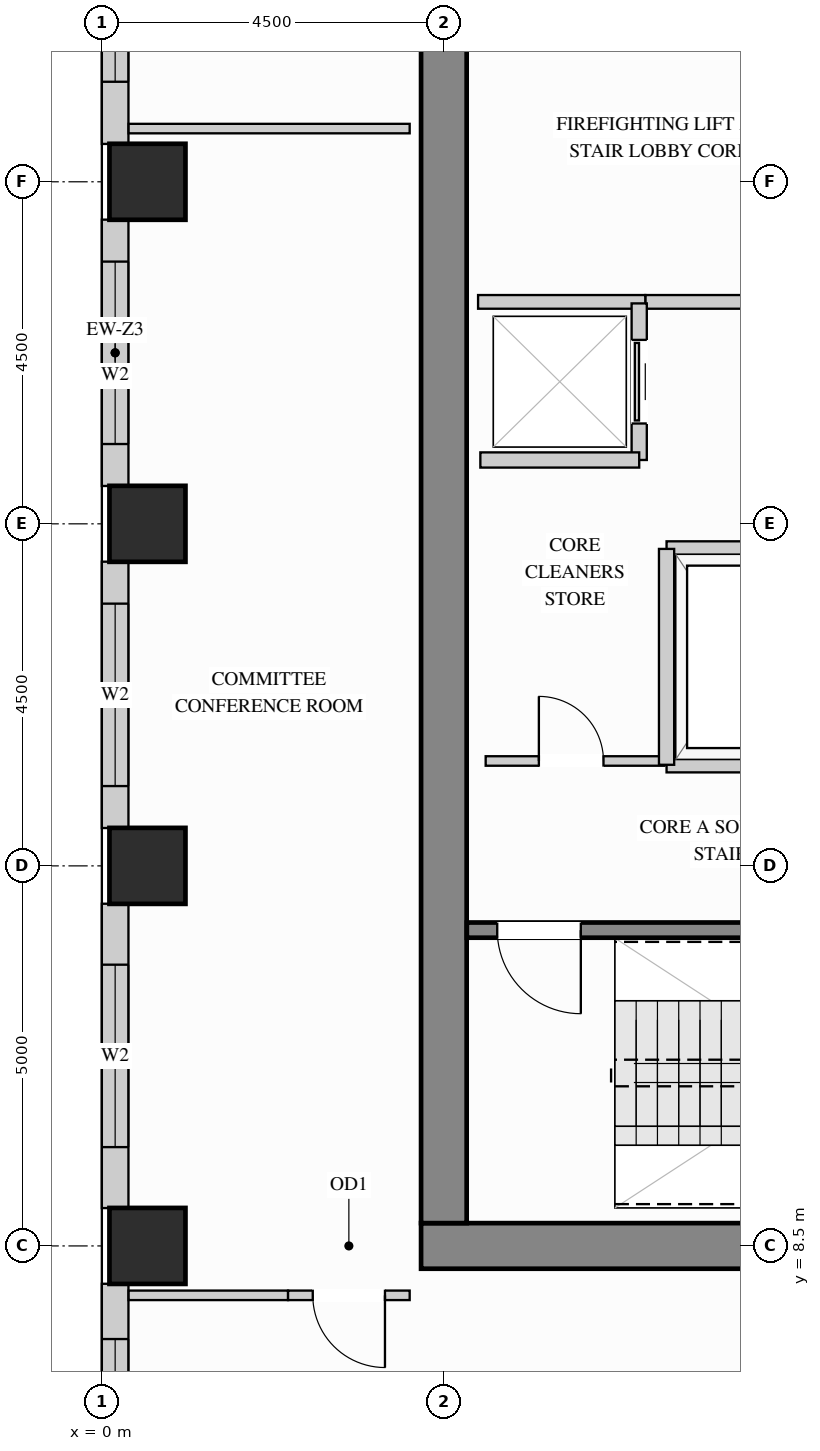
"""IFC4 building model, lengths in metres.
Left out: names, types, materials, properties, quantities, classifications, styles, units other than length and angle.
Written with IfcOpenShell. Run it as: python <this file> out.ifc"""

import sys

from ifc_helpers import new_model, si_unit, direction, frame, frame_2d, origin, origin_2d, place, context, subcontext, project, spatial, rectangle, extrude, source, transform, mapped, element, fill, save


model = new_model("IFC4")
c1 = context("Model", 3, precision=1e-05, world=origin(), true_north=direction((0.0, 1.0)))
c2 = subcontext(c1, "Body", "Model", "MODEL_VIEW")
j1 = project(units=[si_unit("LENGTHUNIT", "METRE"), si_unit("PLANEANGLEUNIT", "RADIAN")], contexts=[c1])
p1 = place(None, origin())
s1 = spatial("IfcSite", under=j1, at=p1, CompositionType="ELEMENT")
p2 = place(p1, origin())
s2 = spatial("IfcBuilding", under=s1, at=p2, CompositionType="ELEMENT")
p3 = place(p2, frame((0.0, 0.0, 179.1)))
s3 = spatial("IfcBuildingStorey", under=s2, at=p3, CompositionType="ELEMENT", Elevation=179.1)
m1 = source(origin(), c2, "Body", "SweptSolid", [
    extrude(rectangle(XDim=1.0, YDim=1.0, at=origin_2d()), origin(), (0.0, 0.0, 1.0), 3.4),
])
for number, where, z_axis, x_axis in (
    (1, (0.6, 13.5, 0.0), (0.0, 0.0, 1.0), (1.0, 0.0, 0.0)),
    (2, (0.6, 18.0, 0.0), (0.0, 0.0, 1.0), (1.0, 0.0, 0.0)),
    (3, (0.6, 22.5, 0.0), (0.0, 0.0, 1.0), (1.0, 0.0, 0.0)),
    (4, (0.6, 8.5, 0.0), (0.0, 0.0, 1.0), (1.0, 0.0, 0.0)),
):
    element("IfcColumn", number, at=place(p3, frame(where, z_axis=z_axis, x_axis=x_axis)), inside=s3, PredefinedType="COLUMN", context=c2, shape_type="MappedRepresentation", body=[
        mapped(m1, transform((0.0, 0.0, 0.0), x_axis=(1.0, 0.0, 0.0), y_axis=(0.0, 1.0, 0.0), z_axis=(0.0, 0.0, 1.0))),
    ])
m2 = source(origin(), c2, "Body", "SweptSolid", [
    extrude(rectangle(XDim=10.6, YDim=0.6, at=frame_2d((5.3, 0.0))), origin(), (0.0, 0.0, 1.0), 3.4),
])
p4 = place(p3, frame((4.2, 8.5, 0.0), z_axis=(0.0, 0.0, 1.0), x_axis=(1.0, 0.0, 0.0)))
e5 = element("IfcWall", 5, at=p4, inside=s3, PredefinedType="SHEAR", context=c2, shape_type="MappedRepresentation", body=[
    mapped(m2, transform((0.0, 0.0, 0.0), x_axis=(1.0, 0.0, 0.0), y_axis=(0.0, 1.0, 0.0), z_axis=(0.0, 0.0, 1.0))),
])
m3 = source(origin(), c2, "Body", "SweptSolid", [
    extrude(rectangle(XDim=20.4, YDim=0.6, at=frame_2d((10.2, 0.0))), origin(), (0.0, 0.0, 1.0), 3.4),
])
p5 = place(p3, frame((4.5, 8.8, 0.0), z_axis=(0.0, 0.0, 1.0), x_axis=(0.0, 1.0, 0.0)))
e6 = element("IfcWall", 6, at=p5, inside=s3, PredefinedType="SHEAR", context=c2, shape_type="MappedRepresentation", body=[
    mapped(m3, transform((0.0, 0.0, 0.0), x_axis=(1.0, 0.0, 0.0), y_axis=(0.0, 1.0, 0.0), z_axis=(0.0, 0.0, 1.0))),
])
p6 = place(p3, frame((0.175, 26.302, 0.0), z_axis=(0.0, 0.0, 1.0), x_axis=(0.0, -1.0, 0.0)))
e7 = element("IfcWall", 7, at=p6, inside=s3, PredefinedType="SOLIDWALL", context=c2, shape_type="SweptSolid", body=[
    extrude(rectangle(XDim=3.304, YDim=0.35, at=frame_2d((1.652, 0.0))), origin(), (0.0, 0.0, 1.0), 2.612),
])
p7 = place(p6, frame((0.686, 0.0, 0.78)))
e8 = element("IfcOpeningElement", 8, at=p7, cuts=e7, PredefinedType="OPENING", context=c2, shape_type="SweptSolid", body=[
    extrude(rectangle(XDim=1.8, YDim=1.652, at=frame_2d((0.9, 0.826))), frame((0.0, 0.185, 0.0), z_axis=(0.0, -1.0, 0.0), x_axis=(1.0, 0.0, 0.0)), (0.0, 0.0, 1.0), 0.37),
])
p8 = place(p3, frame((0.175, 22.002, 0.0), z_axis=(0.0, 0.0, 1.0), x_axis=(0.0, -1.0, 0.0)))
e9 = element("IfcWall", 9, at=p8, inside=s3, PredefinedType="SOLIDWALL", context=c2, shape_type="SweptSolid", body=[
    extrude(rectangle(XDim=3.504, YDim=0.35, at=frame_2d((1.752, 0.0))), origin(), (0.0, 0.0, 1.0), 2.612),
])
p9 = place(p8, frame((0.552, 0.0, 0.78)))
e10 = element("IfcOpeningElement", 10, at=p9, cuts=e9, PredefinedType="OPENING", context=c2, shape_type="SweptSolid", body=[
    extrude(rectangle(XDim=2.4, YDim=1.652, at=frame_2d((1.2, 0.826))), frame((0.0, 0.185, 0.0), z_axis=(0.0, -1.0, 0.0), x_axis=(1.0, 0.0, 0.0)), (0.0, 0.0, 1.0), 0.37),
])
p10 = place(p3, frame((0.175, 17.502, 0.0), z_axis=(0.0, 0.0, 1.0), x_axis=(0.0, -1.0, 0.0)))
e11 = element("IfcWall", 11, at=p10, inside=s3, PredefinedType="SOLIDWALL", context=c2, shape_type="SweptSolid", body=[
    extrude(rectangle(XDim=3.504, YDim=0.35, at=frame_2d((1.752, 0.0))), origin(), (0.0, 0.0, 1.0), 2.612),
])
p11 = place(p10, frame((0.552, 0.0, 0.78)))
e12 = element("IfcOpeningElement", 12, at=p11, cuts=e11, PredefinedType="OPENING", context=c2, shape_type="SweptSolid", body=[
    extrude(rectangle(XDim=2.4, YDim=1.652, at=frame_2d((1.2, 0.826))), frame((0.0, 0.185, 0.0), z_axis=(0.0, -1.0, 0.0), x_axis=(1.0, 0.0, 0.0)), (0.0, 0.0, 1.0), 0.37),
])
p12 = place(p3, frame((0.175, 13.002, 0.0), z_axis=(0.0, 0.0, 1.0), x_axis=(0.0, -1.0, 0.0)))
e13 = element("IfcWall", 13, at=p12, inside=s3, PredefinedType="SOLIDWALL", context=c2, shape_type="SweptSolid", body=[
    extrude(rectangle(XDim=4.004, YDim=0.35, at=frame_2d((2.002, 0.0))), origin(), (0.0, 0.0, 1.0), 2.612),
])
p13 = place(p12, frame((0.802, 0.0, 0.78)))
e14 = element("IfcOpeningElement", 14, at=p13, cuts=e13, PredefinedType="OPENING", context=c2, shape_type="SweptSolid", body=[
    extrude(rectangle(XDim=2.4, YDim=1.652, at=frame_2d((1.2, 0.826))), frame((0.0, 0.185, 0.0), z_axis=(0.0, -1.0, 0.0), x_axis=(1.0, 0.0, 0.0)), (0.0, 0.0, 1.0), 0.37),
])
p14 = place(p3, frame((0.175, 8.002, 0.0), z_axis=(0.0, 0.0, 1.0), x_axis=(0.0, -1.0, 0.0)))
e15 = element("IfcWall", 15, at=p14, inside=s3, PredefinedType="SOLIDWALL", context=c2, shape_type="SweptSolid", body=[
    extrude(rectangle(XDim=4.004, YDim=0.35, at=frame_2d((2.002, 0.0))), origin(), (0.0, 0.0, 1.0), 2.612),
])
p15 = place(p14, frame((0.727, 0.0, 0.78)))
e16 = element("IfcOpeningElement", 16, at=p15, cuts=e15, PredefinedType="OPENING", context=c2, shape_type="SweptSolid", body=[
    extrude(rectangle(XDim=1.8, YDim=1.652, at=frame_2d((0.9, 0.826))), frame((0.0, 0.185, 0.0), z_axis=(0.0, -1.0, 0.0), x_axis=(1.0, 0.0, 0.0)), (0.0, 0.0, 1.0), 0.37),
])
p16 = place(p3, frame((7.15, 20.92, 0.0), z_axis=(0.0, 0.0, 1.0), x_axis=(1.0, 0.0, 0.0)))
e17 = element("IfcWall", 17, at=p16, inside=s3, PredefinedType="PARTITIONING", context=c2, shape_type="SweptSolid", body=[
    extrude(rectangle(XDim=4.68, YDim=0.18, at=frame_2d((2.34, 0.0))), origin(), (0.0, 0.0, 1.0), 3.385),
])
p17 = place(p16, frame((2.2, 0.0, 0.0)))
e18 = element("IfcOpeningElement", 18, at=p17, cuts=e17, PredefinedType="OPENING", context=c2, shape_type="SweptSolid", body=[
    extrude(rectangle(XDim=1.1, YDim=2.15, at=frame_2d((0.55, 1.075))), frame((0.0, 0.1, 0.0), z_axis=(0.0, -1.0, 0.0), x_axis=(1.0, 0.0, 0.0)), (0.0, 0.0, 1.0), 0.2),
])
m4 = source(origin(), c2, "Body", "SweptSolid", [
    extrude(rectangle(XDim=2.2, YDim=0.18, at=frame_2d((1.1, 0.0))), origin(), (0.0, 0.0, 1.0), 3.385),
])
p18 = place(p3, frame((4.95, 20.92, 0.0), z_axis=(0.0, 0.0, 1.0), x_axis=(1.0, 0.0, 0.0)))
e19 = element("IfcWall", 19, at=p18, inside=s3, PredefinedType="PARTITIONING", context=c2, shape_type="MappedRepresentation", body=[
    mapped(m4, transform((0.0, 0.0, 0.0), x_axis=(1.0, 0.0, 0.0), y_axis=(0.0, 1.0, 0.0), z_axis=(0.0, 0.0, 1.0))),
])
p19 = place(p3, frame((5.05, 14.88, 0.0), z_axis=(0.0, 0.0, 1.0), x_axis=(1.0, 0.0, 0.0)))
e20 = element("IfcWall", 20, at=p19, inside=s3, PredefinedType="PARTITIONING", context=c2, shape_type="SweptSolid", body=[
    extrude(rectangle(XDim=2.35, YDim=0.125, at=frame_2d((1.175, 0.0))), origin(), (0.0, 0.0, 1.0), 3.385),
])
p20 = place(p19, frame((0.7, 0.0, 0.0)))
e21 = element("IfcOpeningElement", 21, at=p20, cuts=e20, PredefinedType="OPENING", context=c2, shape_type="SweptSolid", body=[
    extrude(rectangle(XDim=0.85, YDim=2.1, at=frame_2d((0.425, 1.05))), frame((0.0, 0.073, 0.0), z_axis=(0.0, -1.0, 0.0), x_axis=(1.0, 0.0, 0.0)), (0.0, 0.0, 1.0), 0.145),
])
m5 = source(origin(), c2, "Body", "SweptSolid", [
    extrude(rectangle(XDim=2.098, YDim=0.125, at=frame_2d((1.049, 0.0))), origin(), (0.0, 0.0, 1.0), 3.385),
])
p21 = place(p3, frame((0.352, 7.85, 0.0), z_axis=(0.0, 0.0, 1.0), x_axis=(1.0, 0.0, 0.0)))
e22 = element("IfcWall", 22, at=p21, inside=s3, PredefinedType="PARTITIONING", context=c2, shape_type="MappedRepresentation", body=[
    mapped(m5, transform((0.0, 0.0, 0.0), x_axis=(1.0, 0.0, 0.0), y_axis=(0.0, 1.0, 0.0), z_axis=(0.0, 0.0, 1.0))),
])
p22 = place(p3, frame((2.45, 7.85, 0.0), z_axis=(0.0, 0.0, 1.0), x_axis=(1.0, 0.0, 0.0)))
e23 = element("IfcWall", 23, at=p22, inside=s3, PredefinedType="PARTITIONING", context=c2, shape_type="SweptSolid", body=[
    extrude(rectangle(XDim=1.6, YDim=0.125, at=frame_2d((0.8, 0.0))), origin(), (0.0, 0.0, 1.0), 3.385),
])
p23 = place(p22, frame((0.325, 0.0, 0.0)))
e24 = element("IfcOpeningElement", 24, at=p23, cuts=e23, PredefinedType="OPENING", context=c2, shape_type="SweptSolid", body=[
    extrude(rectangle(XDim=0.95, YDim=2.15, at=frame_2d((0.475, 1.075))), frame((0.0, 0.073, 0.0), z_axis=(0.0, -1.0, 0.0), x_axis=(1.0, 0.0, 0.0)), (0.0, 0.0, 1.0), 0.145),
])
m6 = source(origin(), c2, "Body", "SweptSolid", [
    extrude(rectangle(XDim=3.698, YDim=0.125, at=frame_2d((1.849, 0.0))), origin(), (0.0, 0.0, 1.0), 3.385),
])
p24 = place(p3, frame((0.352, 23.2, 0.0), z_axis=(0.0, 0.0, 1.0), x_axis=(1.0, 0.0, 0.0)))
e25 = element("IfcWall", 25, at=p24, inside=s3, PredefinedType="PARTITIONING", context=c2, shape_type="MappedRepresentation", body=[
    mapped(m6, transform((0.0, 0.0, 0.0), x_axis=(1.0, 0.0, 0.0), y_axis=(0.0, 1.0, 0.0), z_axis=(0.0, 0.0, 1.0))),
])
p25 = place(p3, frame((7.07, 18.84, 0.0), z_axis=(0.0, 0.0, 1.0), x_axis=(0.0, 1.0, 0.0)))
e26 = element("IfcWall", 26, at=p25, inside=s3, PredefinedType="PARTITIONING", context=c2, shape_type="SweptSolid", body=[
    extrude(rectangle(XDim=2.06, YDim=0.2, at=frame_2d((1.03, 0.0))), origin(), (0.0, 0.0, 1.0), 3.385),
])
p26 = place(p25, frame((0.48, 0.0, 0.0)))
e27 = element("IfcOpeningElement", 27, at=p26, cuts=e26, PredefinedType="OPENING", context=c2, shape_type="SweptSolid", body=[
    extrude(rectangle(XDim=1.1, YDim=2.2, at=frame_2d((0.55, 1.1))), frame((0.0, 0.11, 0.0), z_axis=(0.0, -1.0, 0.0), x_axis=(1.0, 0.0, 0.0)), (0.0, 0.0, 1.0), 0.22),
])
m7 = source(origin(), c2, "Body", "SweptSolid", [
    extrude(rectangle(XDim=2.09, YDim=0.2, at=frame_2d((1.045, 0.0))), origin(), (0.0, 0.0, 1.0), 3.385),
])
p27 = place(p3, frame((4.98, 18.84, 0.0), z_axis=(0.0, 0.0, 1.0), x_axis=(1.0, 0.0, 0.0)))
e28 = element("IfcWall", 28, at=p27, inside=s3, PredefinedType="PARTITIONING", context=c2, shape_type="MappedRepresentation", body=[
    mapped(m7, transform((0.0, 0.0, 0.0), x_axis=(1.0, 0.0, 0.0), y_axis=(0.0, 1.0, 0.0), z_axis=(0.0, 0.0, 1.0))),
])
m8 = source(origin(), c2, "Body", "SweptSolid", [
    extrude(rectangle(XDim=2.04, YDim=0.2, at=frame_2d((1.02, 0.0))), origin(), (0.0, 0.0, 1.0), 3.385),
])
for number, where, z_axis, x_axis in (
    (29, (7.43, 17.67, 0.0), (0.0, 0.0, 1.0), (1.0, 0.0, 0.0)),
    (30, (7.43, 14.83, 0.0), (0.0, 0.0, 1.0), (1.0, 0.0, 0.0)),
):
    element("IfcWall", number, at=place(p3, frame(where, z_axis=z_axis, x_axis=x_axis)), inside=s3, PredefinedType="PARTITIONING", context=c2, shape_type="MappedRepresentation", body=[
        mapped(m8, transform((0.0, 0.0, 0.0), x_axis=(1.0, 0.0, 0.0), y_axis=(0.0, 1.0, 0.0), z_axis=(0.0, 0.0, 1.0))),
    ])
m9 = source(origin(), c2, "Body", "SweptSolid", [
    extrude(rectangle(XDim=2.84, YDim=0.2, at=frame_2d((1.42, 0.0))), origin(), (0.0, 0.0, 1.0), 3.385),
])
p28 = place(p3, frame((7.43, 14.83, 0.0), z_axis=(0.0, 0.0, 1.0), x_axis=(0.0, 1.0, 0.0)))
e31 = element("IfcWall", 31, at=p28, inside=s3, PredefinedType="PARTITIONING", context=c2, shape_type="MappedRepresentation", body=[
    mapped(m9, transform((0.0, 0.0, 0.0), x_axis=(1.0, 0.0, 0.0), y_axis=(0.0, 1.0, 0.0), z_axis=(0.0, 0.0, 1.0))),
])
p29 = place(p3, frame((4.802, 12.655, 0.0), z_axis=(0.0, 0.0, 1.0), x_axis=(1.0, 0.0, 0.0)))
e32 = element("IfcWall", 32, at=p29, inside=s3, PredefinedType="SHEAR", context=c2, shape_type="SweptSolid", body=[
    extrude(rectangle(XDim=7.603, YDim=0.2, at=frame_2d((3.802, 0.0))), origin(), (0.0, 0.0, 1.0), 3.4),
])
p30 = place(p29, frame((0.4, 0.0, 0.0)))
e33 = element("IfcOpeningElement", 33, at=p30, cuts=e32, PredefinedType="OPENING", context=c2, shape_type="SweptSolid", body=[
    extrude(rectangle(XDim=1.1, YDim=2.15, at=frame_2d((0.55, 1.075))), frame((0.0, 0.11, 0.0), z_axis=(0.0, -1.0, 0.0), x_axis=(1.0, 0.0, 0.0)), (0.0, 0.0, 1.0), 0.22),
])
m10 = source(origin(), c2, "Body", "SweptSolid", [
    extrude(rectangle(XDim=1.1, YDim=2.2, at=frame_2d((0.55, 1.1))), frame((0.0, 0.025, 0.0), z_axis=(0.0, -1.0, 0.0), x_axis=(1.0, 0.0, 0.0)), (0.0, 0.0, 1.0), 0.05),
])
p31 = place(p26, origin())
e34 = element("IfcDoor", 34, at=p31, inside=s3, OperationType="SLIDING_TO_LEFT", PredefinedType="DOOR", context=c2, shape_type="MappedRepresentation", body=[
    mapped(m10, transform((0.0, 0.0, 0.0), x_axis=(1.0, 0.0, 0.0), y_axis=(0.0, 1.0, 0.0), z_axis=(0.0, 0.0, 1.0))),
])
fill(e27, e34)
m11 = source(origin(), c2, "Body", "SweptSolid", [
    extrude(rectangle(XDim=0.95, YDim=2.15, at=frame_2d((0.475, 1.075))), frame((0.0, 0.025, 0.0), z_axis=(0.0, -1.0, 0.0), x_axis=(1.0, 0.0, 0.0)), (0.0, 0.0, 1.0), 0.05),
])
p32 = place(p23, origin())
e35 = element("IfcDoor", 35, at=p32, inside=s3, OperationType="SINGLE_SWING_RIGHT", PredefinedType="DOOR", context=c2, shape_type="MappedRepresentation", body=[
    mapped(m11, transform((0.0, 0.0, 0.0), x_axis=(1.0, 0.0, 0.0), y_axis=(0.0, 1.0, 0.0), z_axis=(0.0, 0.0, 1.0))),
])
fill(e24, e35)
m12 = source(origin(), c2, "Body", "SweptSolid", [
    extrude(rectangle(XDim=0.85, YDim=2.1, at=frame_2d((0.425, 1.05))), frame((0.0, 0.025, 0.0), z_axis=(0.0, -1.0, 0.0), x_axis=(1.0, 0.0, 0.0)), (0.0, 0.0, 1.0), 0.05),
])
p33 = place(p20, origin())
e36 = element("IfcDoor", 36, at=p33, inside=s3, OperationType="SINGLE_SWING_LEFT", PredefinedType="DOOR", context=c2, shape_type="MappedRepresentation", body=[
    mapped(m12, transform((0.0, 0.0, 0.0), x_axis=(1.0, 0.0, 0.0), y_axis=(0.0, 1.0, 0.0), z_axis=(0.0, 0.0, 1.0))),
])
fill(e21, e36)
m13 = source(origin(), c2, "Body", "SweptSolid", [
    extrude(rectangle(XDim=1.1, YDim=2.15, at=frame_2d((0.55, 1.075))), frame((0.0, 0.025, 0.0), z_axis=(0.0, -1.0, 0.0), x_axis=(1.0, 0.0, 0.0)), (0.0, 0.0, 1.0), 0.05),
])
p34 = place(p30, origin())
e37 = element("IfcDoor", 37, at=p34, inside=s3, OperationType="SINGLE_SWING_RIGHT", PredefinedType="DOOR", context=c2, shape_type="MappedRepresentation", body=[
    mapped(m13, transform((0.0, 0.0, 0.0), x_axis=(1.0, 0.0, 0.0), y_axis=(0.0, 1.0, 0.0), z_axis=(0.0, 0.0, 1.0))),
])
fill(e33, e37)
m14 = source(origin(), c2, "Body", "SweptSolid", [
    extrude(rectangle(XDim=1.8, YDim=1.652, at=frame_2d((0.9, 0.826))), frame((0.0, 0.03, 0.0), z_axis=(0.0, -1.0, 0.0), x_axis=(1.0, 0.0, 0.0)), (0.0, 0.0, 1.0), 0.06),
])
p35 = place(p7, origin())
e38 = element("IfcWindow", 38, at=p35, inside=s3, PartitioningType="SINGLE_PANEL", PredefinedType="WINDOW", context=c2, shape_type="MappedRepresentation", body=[
    mapped(m14, transform((0.0, 0.0, 0.0), x_axis=(1.0, 0.0, 0.0), y_axis=(0.0, 1.0, 0.0), z_axis=(0.0, 0.0, 1.0))),
])
fill(e8, e38)
p36 = place(p15, origin())
e39 = element("IfcWindow", 39, at=p36, inside=s3, PartitioningType="SINGLE_PANEL", PredefinedType="WINDOW", context=c2, shape_type="MappedRepresentation", body=[
    mapped(m14, transform((0.0, 0.0, 0.0), x_axis=(1.0, 0.0, 0.0), y_axis=(0.0, 1.0, 0.0), z_axis=(0.0, 0.0, 1.0))),
])
fill(e16, e39)
m15 = source(origin(), c2, "Body", "SweptSolid", [
    extrude(rectangle(XDim=2.4, YDim=1.652, at=frame_2d((1.2, 0.826))), frame((0.0, 0.03, 0.0), z_axis=(0.0, -1.0, 0.0), x_axis=(1.0, 0.0, 0.0)), (0.0, 0.0, 1.0), 0.06),
])
p37 = place(p9, origin())
e40 = element("IfcWindow", 40, at=p37, inside=s3, PartitioningType="SINGLE_PANEL", PredefinedType="WINDOW", context=c2, shape_type="MappedRepresentation", body=[
    mapped(m15, transform((0.0, 0.0, 0.0), x_axis=(1.0, 0.0, 0.0), y_axis=(0.0, 1.0, 0.0), z_axis=(0.0, 0.0, 1.0))),
])
fill(e10, e40)
p38 = place(p11, origin())
e41 = element("IfcWindow", 41, at=p38, inside=s3, PartitioningType="SINGLE_PANEL", PredefinedType="WINDOW", context=c2, shape_type="MappedRepresentation", body=[
    mapped(m15, transform((0.0, 0.0, 0.0), x_axis=(1.0, 0.0, 0.0), y_axis=(0.0, 1.0, 0.0), z_axis=(0.0, 0.0, 1.0))),
])
fill(e12, e41)
p39 = place(p13, origin())
e42 = element("IfcWindow", 42, at=p39, inside=s3, PartitioningType="SINGLE_PANEL", PredefinedType="WINDOW", context=c2, shape_type="MappedRepresentation", body=[
    mapped(m15, transform((0.0, 0.0, 0.0), x_axis=(1.0, 0.0, 0.0), y_axis=(0.0, 1.0, 0.0), z_axis=(0.0, 0.0, 1.0))),
])
fill(e14, e42)
save(model, sys.argv[1])
